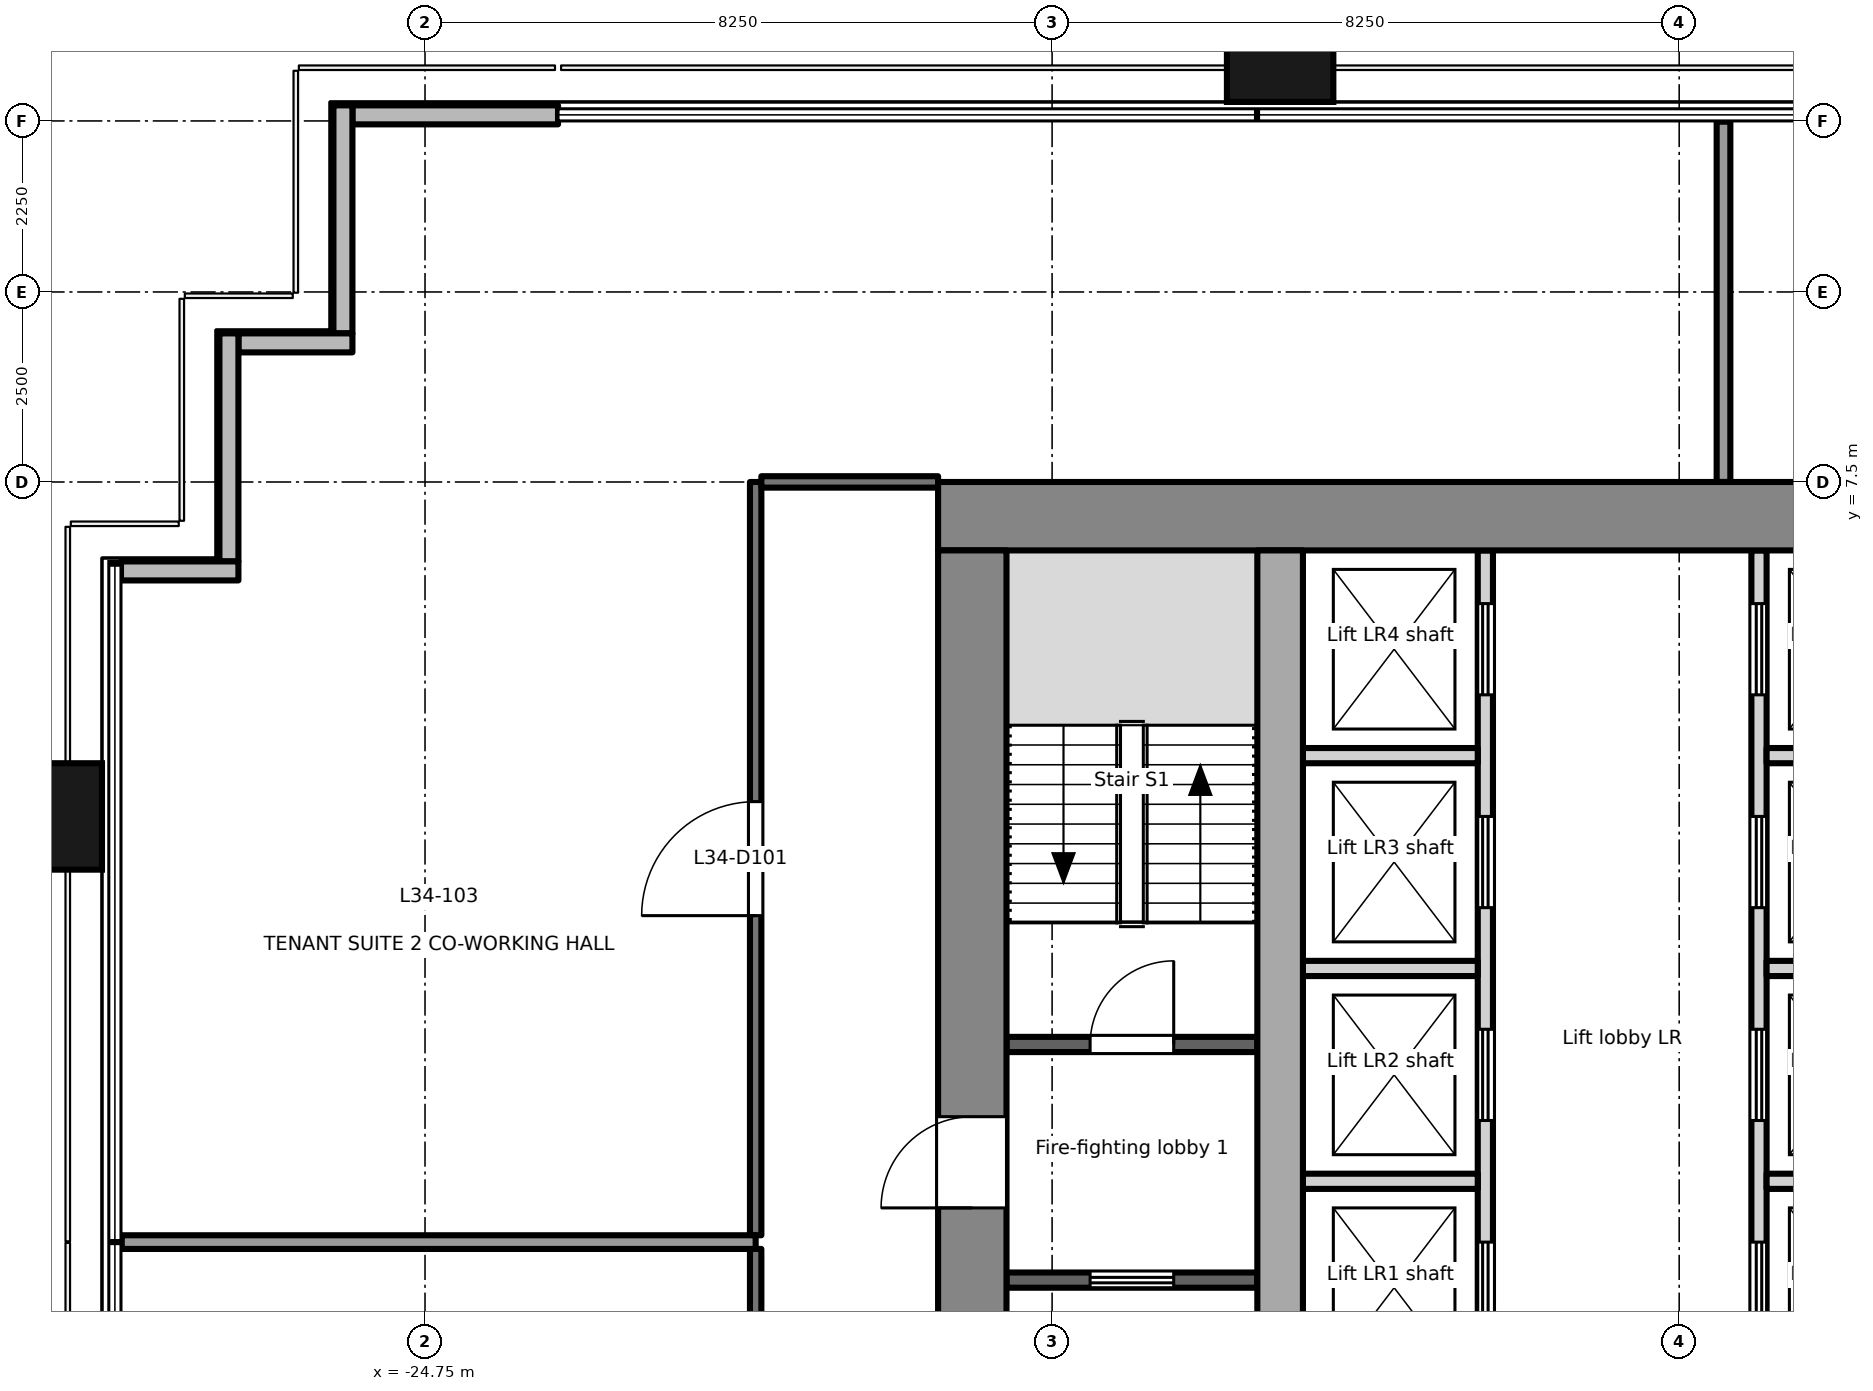
"""IFC4 building model, lengths in metres.
Left out: names, types, materials, properties, quantities, classifications, styles, units other than length and angle.
Written with IfcOpenShell. Run it as: python <this file> out.ifc"""

import sys

from ifc_helpers import new_model, si_unit, direction, frame, frame_2d, origin, origin_2d, place, context, subcontext, project, spatial, rectangle, extrude, element, fill, save


model = new_model("IFC4")
c1 = context("Model", 3, precision=1e-05, world=origin(), true_north=direction((0.0, 1.0)))
c2 = subcontext(c1, "Body", "Model", "MODEL_VIEW")
j1 = project(units=[si_unit("LENGTHUNIT", "METRE"), si_unit("PLANEANGLEUNIT", "RADIAN")], contexts=[c1])
p1 = place(None, origin())
s1 = spatial("IfcSite", under=j1, at=p1, CompositionType="ELEMENT")
p2 = place(p1, origin())
s2 = spatial("IfcBuilding", under=s1, at=p2, CompositionType="ELEMENT")
p3 = place(p2, frame((0.0, 0.0, 150.1)))
s3 = spatial("IfcBuildingStorey", under=s2, at=p3, CompositionType="ELEMENT", Elevation=150.1)
for number, where, z_axis, x_axis in (
    (1, (-29.9, 3.1, -0.2), (0.0, 0.0, 1.0), (0.0, 1.0, 0.0)),
    (2, (-13.5, 13.4, -0.2), (0.0, 0.0, 1.0), (1.0, 0.0, 0.0)),
):
    element("IfcColumn", number, at=place(p3, frame(where, z_axis=z_axis, x_axis=x_axis)), inside=s3, PredefinedType="COLUMN", context=c2, shape_type="SweptSolid", body=[
        extrude(rectangle(XDim=1.4, YDim=1.8, at=origin_2d()), origin(), (0.0, 0.0, 1.0), 4.0),
    ])
p4 = place(p3, frame((-23.0, 12.33, 0.0), z_axis=(0.0, 0.0, 1.0), x_axis=(-1.0, 0.0, 0.0)))
e3 = element("IfcWall", 3, at=p4, inside=s3, PredefinedType="SOLIDWALL", context=c2, shape_type="SweptSolid", body=[
    extrude(rectangle(XDim=2.705, YDim=0.25, at=frame_2d((1.353, 0.0))), origin(), (0.0, 0.0, 1.0), 3.8),
])
p5 = place(p3, frame((-25.83, 12.455, 0.0), z_axis=(0.0, 0.0, 1.0), x_axis=(0.0, -1.0, 0.0)))
e4 = element("IfcWall", 4, at=p5, inside=s3, PredefinedType="SOLIDWALL", context=c2, shape_type="SweptSolid", body=[
    extrude(rectangle(XDim=3.0, YDim=0.25, at=frame_2d((1.5, 0.0))), origin(), (0.0, 0.0, 1.0), 3.8),
])
p6 = place(p3, frame((-25.705, 9.33, 0.0), z_axis=(0.0, 0.0, 1.0), x_axis=(-1.0, 0.0, 0.0)))
e5 = element("IfcWall", 5, at=p6, inside=s3, PredefinedType="SOLIDWALL", context=c2, shape_type="SweptSolid", body=[
    extrude(rectangle(XDim=1.5, YDim=0.25, at=frame_2d((0.75, 0.0))), origin(), (0.0, 0.0, 1.0), 3.8),
])
p7 = place(p3, frame((-27.33, 9.455, 0.0), z_axis=(0.0, 0.0, 1.0), x_axis=(0.0, -1.0, 0.0)))
e6 = element("IfcWall", 6, at=p7, inside=s3, PredefinedType="SOLIDWALL", context=c2, shape_type="SweptSolid", body=[
    extrude(rectangle(XDim=3.0, YDim=0.25, at=frame_2d((1.5, 0.0))), origin(), (0.0, 0.0, 1.0), 3.8),
])
p8 = place(p3, frame((-27.205, 6.33, 0.0), z_axis=(0.0, 0.0, 1.0), x_axis=(-1.0, 0.0, 0.0)))
e7 = element("IfcWall", 7, at=p8, inside=s3, PredefinedType="SOLIDWALL", context=c2, shape_type="SweptSolid", body=[
    extrude(rectangle(XDim=1.545, YDim=0.25, at=frame_2d((0.772, 0.0))), origin(), (0.0, 0.0, 1.0), 3.8),
])
p9 = place(p3, frame((-18.0, 7.05, -0.2), z_axis=(0.0, 0.0, 1.0), x_axis=(1.0, 0.0, 0.0)))
e8 = element("IfcWall", 8, at=p9, inside=s3, PredefinedType="SHEAR", context=c2, shape_type="SweptSolid", body=[
    extrude(rectangle(XDim=36.0, YDim=0.9, at=frame_2d((18.0, 0.0))), origin(), (0.0, 0.0, 1.0), 4.0),
])
p10 = place(p3, frame((-17.55, -6.6, -0.2), z_axis=(0.0, 0.0, 1.0), x_axis=(0.0, 1.0, 0.0)))
e9 = element("IfcWall", 9, at=p10, inside=s3, PredefinedType="SHEAR", context=c2, shape_type="SweptSolid", body=[
    extrude(rectangle(XDim=13.2, YDim=0.9, at=frame_2d((6.6, 0.0))), origin(), (0.0, 0.0, 1.0), 4.0),
])
p11 = place(p10, frame((4.55, 0.0, 0.2)))
e10 = element("IfcOpeningElement", 10, at=p11, cuts=e9, PredefinedType="OPENING", context=c2, shape_type="SweptSolid", body=[
    extrude(rectangle(XDim=1.2, YDim=2.1, at=frame_2d((0.6, 1.05))), frame((0.0, 0.46, 0.0), z_axis=(0.0, -1.0, 0.0), x_axis=(1.0, 0.0, 0.0)), (0.0, 0.0, 1.0), 0.921),
])
p12 = place(p3, frame((-13.5, -6.6, -0.2), z_axis=(0.0, 0.0, 1.0), x_axis=(0.0, 1.0, 0.0)))
e11 = element("IfcWall", 11, at=p12, inside=s3, PredefinedType="SHEAR", context=c2, shape_type="SweptSolid", body=[
    extrude(rectangle(XDim=13.2, YDim=0.6, at=frame_2d((6.6, 0.0))), origin(), (0.0, 0.0, 1.0), 4.0),
])
p13 = place(p3, frame((-17.1, -3.0, 0.0), z_axis=(0.0, 0.0, 1.0), x_axis=(1.0, 0.0, 0.0)))
e12 = element("IfcWall", 12, at=p13, inside=s3, PredefinedType="PARTITIONING", context=c2, shape_type="SweptSolid", body=[
    extrude(rectangle(XDim=3.3, YDim=0.2, at=frame_2d((1.65, 0.0))), origin(), (0.0, 0.0, 1.0), 3.8),
])
p14 = place(p13, frame((1.1, 0.0, 0.0)))
e13 = element("IfcOpeningElement", 13, at=p14, cuts=e12, PredefinedType="OPENING", context=c2, shape_type="SweptSolid", body=[
    extrude(rectangle(XDim=1.1, YDim=2.1, at=frame_2d((0.55, 1.05))), frame((0.0, 0.111, 0.0), z_axis=(0.0, -1.0, 0.0), x_axis=(1.0, 0.0, 0.0)), (0.0, 0.0, 1.0), 0.221),
])
p15 = place(p3, frame((-17.1, 0.1, 0.0), z_axis=(0.0, 0.0, 1.0), x_axis=(1.0, 0.0, 0.0)))
e14 = element("IfcWall", 14, at=p15, inside=s3, PredefinedType="PARTITIONING", context=c2, shape_type="SweptSolid", body=[
    extrude(rectangle(XDim=3.3, YDim=0.2, at=frame_2d((1.65, 0.0))), origin(), (0.0, 0.0, 1.0), 3.8),
])
p16 = place(p15, frame((1.1, 0.0, 0.0)))
e15 = element("IfcOpeningElement", 15, at=p16, cuts=e14, PredefinedType="OPENING", context=c2, shape_type="SweptSolid", body=[
    extrude(rectangle(XDim=1.1, YDim=2.1, at=frame_2d((0.55, 1.05))), frame((0.0, 0.111, 0.0), z_axis=(0.0, -1.0, 0.0), x_axis=(1.0, 0.0, 0.0)), (0.0, 0.0, 1.0), 0.221),
])
p17 = place(p3, frame((-10.8, -6.6, 0.0), z_axis=(0.0, 0.0, 1.0), x_axis=(0.0, 1.0, 0.0)))
e16 = element("IfcWall", 16, at=p17, inside=s3, PredefinedType="PARTITIONING", context=c2, shape_type="SweptSolid", body=[
    extrude(rectangle(XDim=13.2, YDim=0.2, at=frame_2d((6.6, 0.0))), origin(), (0.0, 0.0, 1.0), 3.8),
])
p18 = place(p17, frame((0.55, 0.0, 0.0)))
e17 = element("IfcOpeningElement", 17, at=p18, cuts=e16, PredefinedType="OPENING", context=c2, shape_type="SweptSolid", body=[
    extrude(rectangle(XDim=0.9, YDim=2.1, at=frame_2d((0.45, 1.05))), frame((0.0, 0.111, 0.0), z_axis=(0.0, -1.0, 0.0), x_axis=(1.0, 0.0, 0.0)), (0.0, 0.0, 1.0), 0.221),
])
p19 = place(p17, frame((2.9, 0.0, 0.0)))
e18 = element("IfcOpeningElement", 18, at=p19, cuts=e16, PredefinedType="OPENING", context=c2, shape_type="SweptSolid", body=[
    extrude(rectangle(XDim=1.2, YDim=2.1, at=frame_2d((0.6, 1.05))), frame((0.0, 0.111, 0.0), z_axis=(0.0, -1.0, 0.0), x_axis=(1.0, 0.0, 0.0)), (0.0, 0.0, 1.0), 0.221),
])
p20 = place(p17, frame((5.7, 0.0, 0.0)))
e19 = element("IfcOpeningElement", 19, at=p20, cuts=e16, PredefinedType="OPENING", context=c2, shape_type="SweptSolid", body=[
    extrude(rectangle(XDim=1.2, YDim=2.1, at=frame_2d((0.6, 1.05))), frame((0.0, 0.111, 0.0), z_axis=(0.0, -1.0, 0.0), x_axis=(1.0, 0.0, 0.0)), (0.0, 0.0, 1.0), 0.221),
])
p21 = place(p17, frame((8.5, 0.0, 0.0)))
e20 = element("IfcOpeningElement", 20, at=p21, cuts=e16, PredefinedType="OPENING", context=c2, shape_type="SweptSolid", body=[
    extrude(rectangle(XDim=1.2, YDim=2.1, at=frame_2d((0.6, 1.05))), frame((0.0, 0.111, 0.0), z_axis=(0.0, -1.0, 0.0), x_axis=(1.0, 0.0, 0.0)), (0.0, 0.0, 1.0), 0.221),
])
p22 = place(p17, frame((11.3, 0.0, 0.0)))
e21 = element("IfcOpeningElement", 21, at=p22, cuts=e16, PredefinedType="OPENING", context=c2, shape_type="SweptSolid", body=[
    extrude(rectangle(XDim=1.2, YDim=2.1, at=frame_2d((0.6, 1.05))), frame((0.0, 0.111, 0.0), z_axis=(0.0, -1.0, 0.0), x_axis=(1.0, 0.0, 0.0)), (0.0, 0.0, 1.0), 0.221),
])
p23 = place(p3, frame((-7.2, -6.6, 0.0), z_axis=(0.0, 0.0, 1.0), x_axis=(0.0, 1.0, 0.0)))
e22 = element("IfcWall", 22, at=p23, inside=s3, PredefinedType="PARTITIONING", context=c2, shape_type="SweptSolid", body=[
    extrude(rectangle(XDim=13.2, YDim=0.2, at=frame_2d((6.6, 0.0))), origin(), (0.0, 0.0, 1.0), 3.8),
])
p24 = place(p23, frame((0.55, 0.0, 0.0)))
e23 = element("IfcOpeningElement", 23, at=p24, cuts=e22, PredefinedType="OPENING", context=c2, shape_type="SweptSolid", body=[
    extrude(rectangle(XDim=0.9, YDim=2.1, at=frame_2d((0.45, 1.05))), frame((0.0, 0.111, 0.0), z_axis=(0.0, -1.0, 0.0), x_axis=(1.0, 0.0, 0.0)), (0.0, 0.0, 1.0), 0.221),
])
p25 = place(p23, frame((2.9, 0.0, 0.0)))
e24 = element("IfcOpeningElement", 24, at=p25, cuts=e22, PredefinedType="OPENING", context=c2, shape_type="SweptSolid", body=[
    extrude(rectangle(XDim=1.2, YDim=2.1, at=frame_2d((0.6, 1.05))), frame((0.0, 0.111, 0.0), z_axis=(0.0, -1.0, 0.0), x_axis=(1.0, 0.0, 0.0)), (0.0, 0.0, 1.0), 0.221),
])
p26 = place(p23, frame((5.7, 0.0, 0.0)))
e25 = element("IfcOpeningElement", 25, at=p26, cuts=e22, PredefinedType="OPENING", context=c2, shape_type="SweptSolid", body=[
    extrude(rectangle(XDim=1.2, YDim=2.1, at=frame_2d((0.6, 1.05))), frame((0.0, 0.111, 0.0), z_axis=(0.0, -1.0, 0.0), x_axis=(1.0, 0.0, 0.0)), (0.0, 0.0, 1.0), 0.221),
])
p27 = place(p23, frame((8.5, 0.0, 0.0)))
e26 = element("IfcOpeningElement", 26, at=p27, cuts=e22, PredefinedType="OPENING", context=c2, shape_type="SweptSolid", body=[
    extrude(rectangle(XDim=1.2, YDim=2.1, at=frame_2d((0.6, 1.05))), frame((0.0, 0.111, 0.0), z_axis=(0.0, -1.0, 0.0), x_axis=(1.0, 0.0, 0.0)), (0.0, 0.0, 1.0), 0.221),
])
p28 = place(p23, frame((11.3, 0.0, 0.0)))
e27 = element("IfcOpeningElement", 27, at=p28, cuts=e22, PredefinedType="OPENING", context=c2, shape_type="SweptSolid", body=[
    extrude(rectangle(XDim=1.2, YDim=2.1, at=frame_2d((0.6, 1.05))), frame((0.0, 0.111, 0.0), z_axis=(0.0, -1.0, 0.0), x_axis=(1.0, 0.0, 0.0)), (0.0, 0.0, 1.0), 0.221),
])
for number, where, z_axis, x_axis in (
    (28, (-13.2, -1.7, 0.0), (0.0, 0.0, 1.0), (1.0, 0.0, 0.0)),
    (29, (-13.2, 1.1, 0.0), (0.0, 0.0, 1.0), (1.0, 0.0, 0.0)),
    (30, (-13.2, 3.9, 0.0), (0.0, 0.0, 1.0), (1.0, 0.0, 0.0)),
    (31, (-7.1, -1.7, 0.0), (0.0, 0.0, 1.0), (1.0, 0.0, 0.0)),
    (32, (-7.1, 1.1, 0.0), (0.0, 0.0, 1.0), (1.0, 0.0, 0.0)),
    (33, (-7.1, 3.9, 0.0), (0.0, 0.0, 1.0), (1.0, 0.0, 0.0)),
):
    element("IfcWall", number, at=place(p3, frame(where, z_axis=z_axis, x_axis=x_axis)), inside=s3, PredefinedType="PARTITIONING", context=c2, shape_type="SweptSolid", body=[
        extrude(rectangle(XDim=2.3, YDim=0.2, at=frame_2d((1.15, 0.0))), origin(), (0.0, 0.0, 1.0), 3.8),
    ])
p29 = place(p3, frame((-20.4, -10.78, 0.0), z_axis=(0.0, 0.0, 1.0), x_axis=(0.0, 1.0, 0.0)))
e34 = element("IfcWall", 34, at=p29, inside=s3, PredefinedType="PARTITIONING", context=c2, shape_type="SweptSolid", body=[
    extrude(rectangle(XDim=8.19, YDim=0.15, at=frame_2d((4.095, 0.0))), origin(), (0.0, 0.0, 1.0), 3.3),
])
p30 = place(p29, frame((3.645, 0.0, 0.0)))
e35 = element("IfcOpeningElement", 35, at=p30, cuts=e34, PredefinedType="OPENING", context=c2, shape_type="SweptSolid", body=[
    extrude(rectangle(XDim=0.9, YDim=2.1, at=frame_2d((0.45, 1.05))), frame((0.0, 0.085, 0.0), z_axis=(0.0, -1.0, 0.0), x_axis=(1.0, 0.0, 0.0)), (0.0, 0.0, 1.0), 0.171),
])
p31 = place(p3, frame((-20.4, -2.41, 0.0), z_axis=(0.0, 0.0, 1.0), x_axis=(0.0, 1.0, 0.0)))
e36 = element("IfcWall", 36, at=p31, inside=s3, PredefinedType="PARTITIONING", context=c2, shape_type="SweptSolid", body=[
    extrude(rectangle(XDim=9.91, YDim=0.15, at=frame_2d((4.955, 0.0))), origin(), (0.0, 0.0, 1.0), 3.3),
])
p32 = place(p31, frame((4.205, 0.0, 0.0)))
e37 = element("IfcOpeningElement", 37, at=p32, cuts=e36, PredefinedType="OPENING", context=c2, shape_type="SweptSolid", body=[
    extrude(rectangle(XDim=1.5, YDim=2.1, at=frame_2d((0.75, 1.05))), frame((0.0, 0.085, 0.0), z_axis=(0.0, -1.0, 0.0), x_axis=(1.0, 0.0, 0.0)), (0.0, 0.0, 1.0), 0.171),
])
p33 = place(p3, frame((-20.325, 7.501, 0.0), z_axis=(0.0, 0.0, 1.0), x_axis=(1.0, 0.0, 0.0)))
e38 = element("IfcWall", 38, at=p33, inside=s3, PredefinedType="PARTITIONING", context=c2, shape_type="SweptSolid", body=[
    extrude(rectangle(XDim=2.325, YDim=0.15, at=frame_2d((1.163, 0.0))), origin(), (0.0, 0.0, 1.0), 3.8),
])
p34 = place(p3, frame((-28.74, -2.5, 0.0), z_axis=(0.0, 0.0, 1.0), x_axis=(1.0, 0.0, 0.0)))
e39 = element("IfcWall", 39, at=p34, inside=s3, PredefinedType="PARTITIONING", context=c2, shape_type="SweptSolid", body=[
    extrude(rectangle(XDim=8.34, YDim=0.18, at=frame_2d((4.17, 0.0))), origin(), (0.0, 0.0, 1.0), 3.8),
])
p35 = place(p3, frame((-7.667, 12.24, 0.0), z_axis=(0.0, 0.0, 1.0), x_axis=(0.0, -1.0, 0.0)))
e40 = element("IfcWall", 40, at=p35, inside=s3, PredefinedType="PARTITIONING", context=c2, shape_type="SweptSolid", body=[
    extrude(rectangle(XDim=4.74, YDim=0.18, at=frame_2d((2.37, 0.0))), origin(), (0.0, 0.0, 1.0), 3.8),
])
p36 = place(p14, origin())
e41 = element("IfcDoor", 41, at=p36, inside=s3, OperationType="DOUBLE_DOOR_SLIDING", PredefinedType="DOOR", context=c2, shape_type="SweptSolid", body=[
    extrude(rectangle(XDim=1.1, YDim=2.1, at=frame_2d((0.55, 1.05))), frame((0.0, 0.025, 0.0), z_axis=(0.0, -1.0, 0.0), x_axis=(1.0, 0.0, 0.0)), (0.0, 0.0, 1.0), 0.05),
])
fill(e13, e41)
p37 = place(p11, origin())
e42 = element("IfcDoor", 42, at=p37, inside=s3, OperationType="SINGLE_SWING_LEFT", PredefinedType="DOOR", context=c2, shape_type="SweptSolid", body=[
    extrude(rectangle(XDim=1.2, YDim=2.1, at=frame_2d((0.6, 1.05))), frame((0.0, 0.025, 0.0), z_axis=(0.0, -1.0, 0.0), x_axis=(1.0, 0.0, 0.0)), (0.0, 0.0, 1.0), 0.05),
])
fill(e10, e42)
p38 = place(p16, origin())
e43 = element("IfcDoor", 43, at=p38, inside=s3, OperationType="SINGLE_SWING_RIGHT", PredefinedType="DOOR", context=c2, shape_type="SweptSolid", body=[
    extrude(rectangle(XDim=1.1, YDim=2.1, at=frame_2d((0.55, 1.05))), frame((0.0, 0.025, 0.0), z_axis=(0.0, -1.0, 0.0), x_axis=(1.0, 0.0, 0.0)), (0.0, 0.0, 1.0), 0.05),
])
fill(e15, e43)
p39 = place(p19, origin())
e44 = element("IfcDoor", 44, at=p39, inside=s3, OperationType="DOUBLE_DOOR_SLIDING", PredefinedType="DOOR", context=c2, shape_type="SweptSolid", body=[
    extrude(rectangle(XDim=1.2, YDim=2.1, at=frame_2d((0.6, 1.05))), frame((0.0, 0.025, 0.0), z_axis=(0.0, -1.0, 0.0), x_axis=(1.0, 0.0, 0.0)), (0.0, 0.0, 1.0), 0.05),
])
fill(e18, e44)
p40 = place(p20, origin())
e45 = element("IfcDoor", 45, at=p40, inside=s3, OperationType="DOUBLE_DOOR_SLIDING", PredefinedType="DOOR", context=c2, shape_type="SweptSolid", body=[
    extrude(rectangle(XDim=1.2, YDim=2.1, at=frame_2d((0.6, 1.05))), frame((0.0, 0.025, 0.0), z_axis=(0.0, -1.0, 0.0), x_axis=(1.0, 0.0, 0.0)), (0.0, 0.0, 1.0), 0.05),
])
fill(e19, e45)
p41 = place(p21, origin())
e46 = element("IfcDoor", 46, at=p41, inside=s3, OperationType="DOUBLE_DOOR_SLIDING", PredefinedType="DOOR", context=c2, shape_type="SweptSolid", body=[
    extrude(rectangle(XDim=1.2, YDim=2.1, at=frame_2d((0.6, 1.05))), frame((0.0, 0.025, 0.0), z_axis=(0.0, -1.0, 0.0), x_axis=(1.0, 0.0, 0.0)), (0.0, 0.0, 1.0), 0.05),
])
fill(e20, e46)
p42 = place(p22, origin())
e47 = element("IfcDoor", 47, at=p42, inside=s3, OperationType="DOUBLE_DOOR_SLIDING", PredefinedType="DOOR", context=c2, shape_type="SweptSolid", body=[
    extrude(rectangle(XDim=1.2, YDim=2.1, at=frame_2d((0.6, 1.05))), frame((0.0, 0.025, 0.0), z_axis=(0.0, -1.0, 0.0), x_axis=(1.0, 0.0, 0.0)), (0.0, 0.0, 1.0), 0.05),
])
fill(e21, e47)
p43 = place(p25, origin())
e48 = element("IfcDoor", 48, at=p43, inside=s3, OperationType="DOUBLE_DOOR_SLIDING", PredefinedType="DOOR", context=c2, shape_type="SweptSolid", body=[
    extrude(rectangle(XDim=1.2, YDim=2.1, at=frame_2d((0.6, 1.05))), frame((0.0, 0.025, 0.0), z_axis=(0.0, -1.0, 0.0), x_axis=(1.0, 0.0, 0.0)), (0.0, 0.0, 1.0), 0.05),
])
fill(e24, e48)
p44 = place(p26, origin())
e49 = element("IfcDoor", 49, at=p44, inside=s3, OperationType="DOUBLE_DOOR_SLIDING", PredefinedType="DOOR", context=c2, shape_type="SweptSolid", body=[
    extrude(rectangle(XDim=1.2, YDim=2.1, at=frame_2d((0.6, 1.05))), frame((0.0, 0.025, 0.0), z_axis=(0.0, -1.0, 0.0), x_axis=(1.0, 0.0, 0.0)), (0.0, 0.0, 1.0), 0.05),
])
fill(e25, e49)
p45 = place(p27, origin())
e50 = element("IfcDoor", 50, at=p45, inside=s3, OperationType="DOUBLE_DOOR_SLIDING", PredefinedType="DOOR", context=c2, shape_type="SweptSolid", body=[
    extrude(rectangle(XDim=1.2, YDim=2.1, at=frame_2d((0.6, 1.05))), frame((0.0, 0.025, 0.0), z_axis=(0.0, -1.0, 0.0), x_axis=(1.0, 0.0, 0.0)), (0.0, 0.0, 1.0), 0.05),
])
fill(e26, e50)
p46 = place(p28, origin())
e51 = element("IfcDoor", 51, at=p46, inside=s3, OperationType="DOUBLE_DOOR_SLIDING", PredefinedType="DOOR", context=c2, shape_type="SweptSolid", body=[
    extrude(rectangle(XDim=1.2, YDim=2.1, at=frame_2d((0.6, 1.05))), frame((0.0, 0.025, 0.0), z_axis=(0.0, -1.0, 0.0), x_axis=(1.0, 0.0, 0.0)), (0.0, 0.0, 1.0), 0.05),
])
fill(e27, e51)
p47 = place(p32, origin())
e52 = element("IfcDoor", 52, at=p47, inside=s3, OperationType="DOUBLE_DOOR_SINGLE_SWING", PredefinedType="DOOR", context=c2, shape_type="SweptSolid", body=[
    extrude(rectangle(XDim=1.5, YDim=2.1, at=frame_2d((0.75, 1.05))), frame((0.0, 0.025, 0.0), z_axis=(0.0, -1.0, 0.0), x_axis=(1.0, 0.0, 0.0)), (0.0, 0.0, 1.0), 0.05),
])
fill(e37, e52)
save(model, sys.argv[1])
